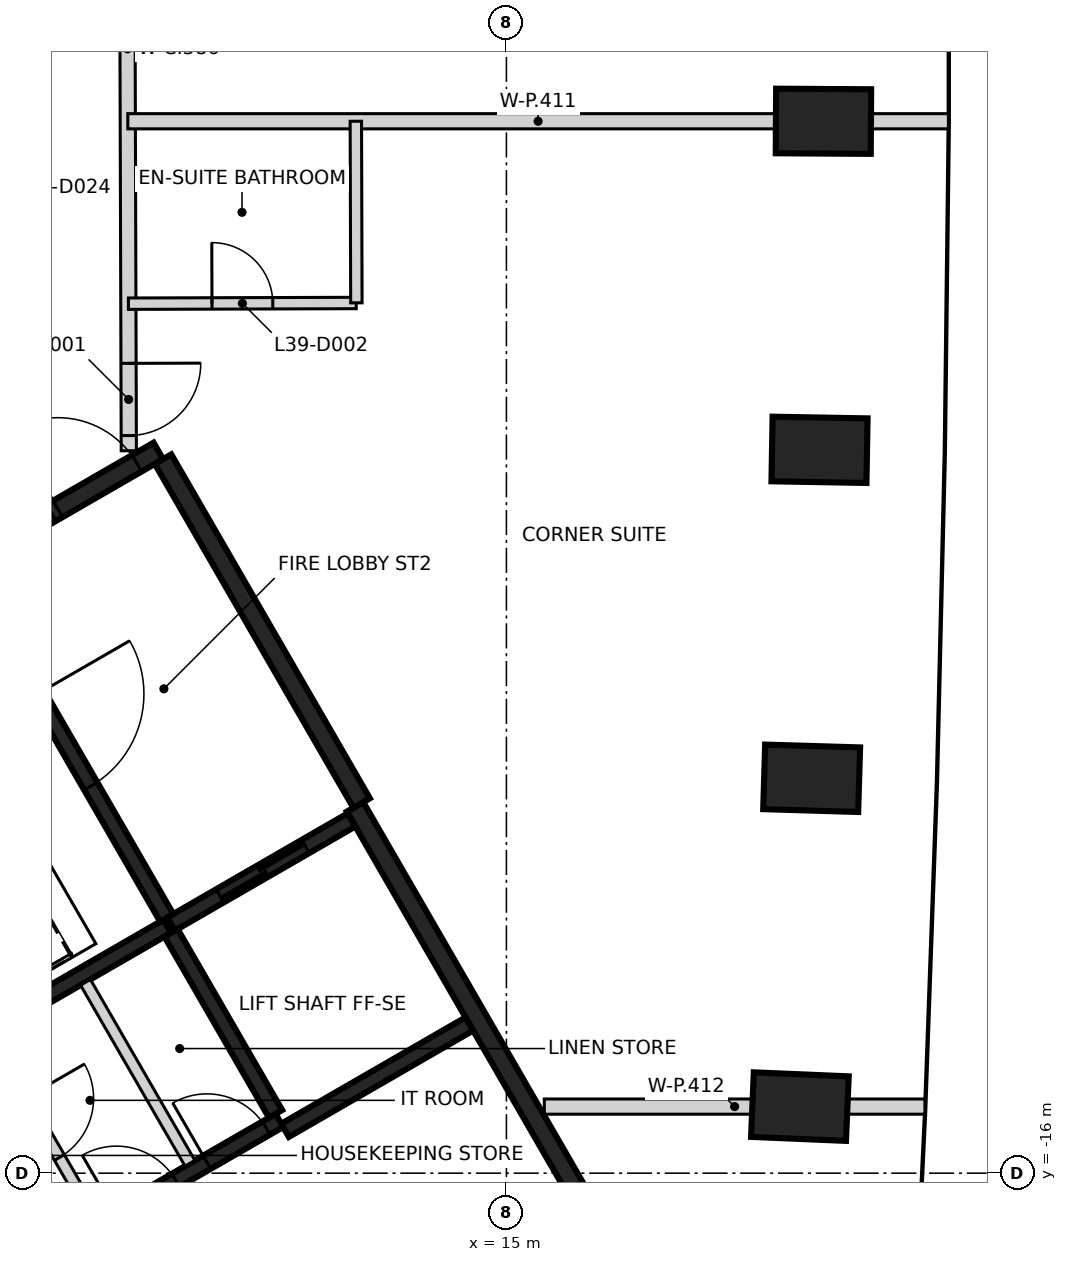
"""IFC4 building model, lengths in metres.
Left out: names, types, materials, properties, quantities, classifications, styles, units other than length and angle.
Written with IfcOpenShell. Run it as: python <this file> out.ifc"""

import sys

from ifc_helpers import new_model, si_unit, direction, frame, frame_2d, origin, origin_2d, place, context, subcontext, project, spatial, rectangle, extrude, element, fill, save


model = new_model("IFC4")
c1 = context("Model", 3, precision=1e-05, world=origin(), true_north=direction((0.0, 1.0)))
c2 = subcontext(c1, "Body", "Model", "MODEL_VIEW")
j1 = project(units=[si_unit("LENGTHUNIT", "METRE"), si_unit("PLANEANGLEUNIT", "RADIAN")], contexts=[c1])
p1 = place(None, origin())
s1 = spatial("IfcSite", under=j1, at=p1, CompositionType="ELEMENT")
p2 = place(p1, origin())
s2 = spatial("IfcBuilding", under=s1, at=p2, CompositionType="ELEMENT")
p3 = place(p2, frame((0.0, 0.0, 157.6)))
s3 = spatial("IfcBuildingStorey", under=s2, at=p3, CompositionType="ELEMENT", Elevation=157.6)
for number, where, z_axis, x_axis in (
    (1, (18.861, -15.124, -0.4), (0.0, 0.0, 1.0), (-0.999, 0.042, 0.0)),
    (2, (19.016, -10.805, -0.4), (0.0, 0.0, 1.0), (-1.0, 0.03, 0.0)),
    (3, (19.119, -6.484, -0.4), (0.0, 0.0, 1.0), (-1.0, 0.018, 0.0)),
    (4, (19.171, -2.161, -0.4), (0.0, 0.0, 1.0), (-1.0, 0.006, 0.0)),
):
    element("IfcColumn", number, at=place(p3, frame(where, z_axis=z_axis, x_axis=x_axis)), inside=s3, PredefinedType="COLUMN", context=c2, shape_type="SweptSolid", body=[
        extrude(rectangle(XDim=1.25, YDim=0.85, at=origin_2d()), origin(), (0.0, 0.0, 1.0), 3.6),
    ])
p4 = place(p3, frame((0.417, -12.273, 0.0), z_axis=(0.0, 0.0, 1.0), x_axis=(0.866021906294, 0.500006057782, 0.0)))
e5 = element("IfcWall", 5, at=p4, inside=s3, PredefinedType="SHEAR", context=c2, shape_type="SweptSolid", body=[
    extrude(rectangle(XDim=11.55, YDim=0.25, at=frame_2d((5.775, 0.0))), origin(), (0.0, 0.0, 1.0), 3.2),
])
p5 = place(p4, frame((10.025, 0.0, 0.0)))
e6 = element("IfcOpeningElement", 6, at=p5, cuts=e5, PredefinedType="OPENING", context=c2, shape_type="SweptSolid", body=[
    extrude(rectangle(XDim=1.2, YDim=2.1, at=frame_2d((0.6, 1.05))), frame((0.0, 0.135, 0.0), z_axis=(0.0, -1.0, 0.0), x_axis=(1.0, 0.0, 0.0)), (0.0, 0.0, 1.0), 0.27),
])
p6 = place(p4, frame((8.725, 0.0, 0.0)))
e7 = element("IfcOpeningElement", 7, at=p6, cuts=e5, PredefinedType="OPENING", context=c2, shape_type="SweptSolid", body=[
    extrude(rectangle(XDim=1.2, YDim=2.1, at=frame_2d((0.6, 1.05))), frame((0.0, 0.135, 0.0), z_axis=(0.0, -1.0, 0.0), x_axis=(1.0, 0.0, 0.0)), (0.0, 0.0, 1.0), 0.27),
])
p7 = place(p3, frame((13.008, -11.181, 0.0), z_axis=(0.0, 0.0, 1.0), x_axis=(0.500004234368, -0.866022959057, 0.0)))
e8 = element("IfcWall", 8, at=p7, inside=s3, PredefinedType="SHEAR", context=c2, shape_type="SweptSolid", body=[
    extrude(rectangle(XDim=6.25, YDim=0.25, at=frame_2d((3.125, 0.0))), origin(), (0.0, 0.0, 1.0), 3.2),
])
p8 = place(p3, frame((10.483, -6.606, 0.0), z_axis=(0.0, 0.0, 1.0), x_axis=(0.49999885962, -0.866026062182, 0.0)))
e9 = element("IfcWall", 9, at=p8, inside=s3, PredefinedType="SHEAR", context=c2, shape_type="SweptSolid", body=[
    extrude(rectangle(XDim=5.225, YDim=0.25, at=frame_2d((2.612, 0.0))), origin(), (0.0, 0.0, 1.0), 3.2),
])
p9 = place(p3, frame((10.538, -12.752, 0.0), z_axis=(0.0, 0.0, 1.0), x_axis=(-0.866038630372, -0.499977090179, 0.0)))
e10 = element("IfcWall", 10, at=p9, inside=s3, PredefinedType="SHEAR", context=c2, shape_type="SweptSolid", body=[
    extrude(rectangle(XDim=5.699, YDim=0.2, at=frame_2d((2.85, 0.0))), origin(), (0.0, 0.0, 1.0), 3.2),
])
p10 = place(p3, frame((7.077, -18.156, 0.0), z_axis=(0.0, 0.0, 1.0), x_axis=(0.866038630372, 0.499977090179, 0.0)))
e11 = element("IfcWall", 11, at=p10, inside=s3, PredefinedType="SHEAR", context=c2, shape_type="SweptSolid", body=[
    extrude(rectangle(XDim=5.699, YDim=0.2, at=frame_2d((2.85, 0.0))), origin(), (0.0, 0.0, 1.0), 3.2),
])
p11 = place(p10, frame((3.224, 0.0, 0.0)))
e12 = element("IfcOpeningElement", 12, at=p11, cuts=e11, PredefinedType="OPENING", context=c2, shape_type="SweptSolid", body=[
    extrude(rectangle(XDim=0.9, YDim=2.1, at=frame_2d((0.45, 1.05))), frame((0.0, 0.11, 0.0), z_axis=(0.0, -1.0, 0.0), x_axis=(1.0, 0.0, 0.0)), (0.0, 0.0, 1.0), 0.22),
])
p12 = place(p10, frame((4.599, 0.0, 0.0)))
e13 = element("IfcOpeningElement", 13, at=p12, cuts=e11, PredefinedType="OPENING", context=c2, shape_type="SweptSolid", body=[
    extrude(rectangle(XDim=0.9, YDim=2.1, at=frame_2d((0.45, 1.05))), frame((0.0, 0.11, 0.0), z_axis=(0.0, -1.0, 0.0), x_axis=(1.0, 0.0, 0.0)), (0.0, 0.0, 1.0), 0.22),
])
p13 = place(p3, frame((7.906, -8.094, 0.0), z_axis=(0.0, 0.0, 1.0), x_axis=(0.500024287448, -0.866011380966, 0.0)))
e14 = element("IfcWall", 14, at=p13, inside=s3, PredefinedType="SHEAR", context=c2, shape_type="SweptSolid", body=[
    extrude(rectangle(XDim=5.251, YDim=0.2, at=frame_2d((2.625, 0.0))), origin(), (0.0, 0.0, 1.0), 3.2),
])
p14 = place(p13, frame((1.849, 0.0, 0.0)))
e15 = element("IfcOpeningElement", 15, at=p14, cuts=e14, PredefinedType="OPENING", context=c2, shape_type="SweptSolid", body=[
    extrude(rectangle(XDim=1.4, YDim=2.1, at=frame_2d((0.7, 1.05))), frame((0.0, 0.11, 0.0), z_axis=(0.0, -1.0, 0.0), x_axis=(1.0, 0.0, 0.0)), (0.0, 0.0, 1.0), 0.22),
])
p15 = place(p3, frame((11.963, -15.22, 0.0), z_axis=(0.0, 0.0, 1.0), x_axis=(-0.500034990121, 0.866005201286, 0.0)))
e16 = element("IfcWall", 16, at=p15, inside=s3, PredefinedType="SHEAR", context=c2, shape_type="SweptSolid", body=[
    extrude(rectangle(XDim=2.75, YDim=0.2, at=frame_2d((1.375, 0.0))), origin(), (0.0, 0.0, 1.0), 3.2),
])
p16 = place(p3, frame((10.587, -12.723, 0.0), z_axis=(0.0, 0.0, 1.0), x_axis=(0.866037306777, 0.499979382845, 0.0)))
e17 = element("IfcWall", 17, at=p16, inside=s3, PredefinedType="SHEAR", context=c2, shape_type="SweptSolid", body=[
    extrude(rectangle(XDim=2.742, YDim=0.2, at=frame_2d((1.371, 0.0))), origin(), (0.0, 0.0, 1.0), 3.2),
])
p17 = place(p16, frame((0.743, 0.0, 0.0)))
e18 = element("IfcOpeningElement", 18, at=p17, cuts=e17, PredefinedType="OPENING", context=c2, shape_type="SweptSolid", body=[
    extrude(rectangle(XDim=1.3, YDim=2.1, at=frame_2d((0.65, 1.05))), frame((0.0, 0.11, 0.0), z_axis=(0.0, -1.0, 0.0), x_axis=(1.0, 0.0, 0.0)), (0.0, 0.0, 1.0), 0.22),
])
p18 = place(p3, frame((14.512, -14.037, 0.0), z_axis=(0.0, 0.0, 1.0), x_axis=(-0.866044696403, -0.499966582715, 0.0)))
e19 = element("IfcWall", 19, at=p18, inside=s3, PredefinedType="SHEAR", context=c2, shape_type="SweptSolid", body=[
    extrude(rectangle(XDim=2.799, YDim=0.2, at=frame_2d((1.399, 0.0))), origin(), (0.0, 0.0, 1.0), 3.2),
])
p19 = place(p3, frame((8.207, -14.214, 0.0), z_axis=(0.0, 0.0, 1.0), x_axis=(0.50002746344, -0.86600954718, 0.0)))
e20 = element("IfcWall", 20, at=p19, inside=s3, PredefinedType="PARTITIONING", context=c2, shape_type="SweptSolid", body=[
    extrude(rectangle(XDim=2.748, YDim=0.15, at=frame_2d((1.374, 0.0))), origin(), (0.0, 0.0, 1.0), 3.2),
])
p20 = place(p19, frame((0.924, 0.0, 0.0)))
e21 = element("IfcOpeningElement", 21, at=p20, cuts=e20, PredefinedType="OPENING", context=c2, shape_type="SweptSolid", body=[
    extrude(rectangle(XDim=0.9, YDim=2.1, at=frame_2d((0.45, 1.05))), frame((0.0, 0.085, 0.0), z_axis=(0.0, -1.0, 0.0), x_axis=(1.0, 0.0, 0.0)), (0.0, 0.0, 1.0), 0.17),
])
p21 = place(p3, frame((9.462, -13.489, 0.0), z_axis=(0.0, 0.0, 1.0), x_axis=(0.499988999718, -0.866031754707, 0.0)))
e22 = element("IfcWall", 22, at=p21, inside=s3, PredefinedType="PARTITIONING", context=c2, shape_type="SweptSolid", body=[
    extrude(rectangle(XDim=2.749, YDim=0.15, at=frame_2d((1.374, 0.0))), origin(), (0.0, 0.0, 1.0), 3.2),
])
p22 = place(p3, frame((10.0, 4.078, 0.0), z_axis=(0.0, 0.0, 1.0), x_axis=(0.003070798941, -0.999995285086, 0.0)))
e23 = element("IfcWall", 23, at=p22, inside=s3, PredefinedType="PARTITIONING", context=c2, shape_type="SweptSolid", body=[
    extrude(rectangle(XDim=10.574, YDim=0.2, at=frame_2d((5.287, 0.0))), origin(), (0.0, 0.0, 1.0), 3.2),
])
p23 = place(p22, frame((9.424, 0.0, 0.0)))
e24 = element("IfcOpeningElement", 24, at=p23, cuts=e23, PredefinedType="OPENING", context=c2, shape_type="SweptSolid", body=[
    extrude(rectangle(XDim=0.95, YDim=2.1, at=frame_2d((0.475, 1.05))), frame((0.0, 0.11, 0.0), z_axis=(0.0, -1.0, 0.0), x_axis=(1.0, 0.0, 0.0)), (0.0, 0.0, 1.0), 0.22),
])
p24 = place(p22, frame((2.651, 0.0, 0.0)))
e25 = element("IfcOpeningElement", 25, at=p24, cuts=e23, PredefinedType="OPENING", context=c2, shape_type="SweptSolid", body=[
    extrude(rectangle(XDim=0.95, YDim=2.1, at=frame_2d((0.475, 1.05))), frame((0.0, 0.11, 0.0), z_axis=(0.0, -1.0, 0.0), x_axis=(1.0, 0.0, 0.0)), (0.0, 0.0, 1.0), 0.22),
])
p25 = place(p3, frame((10.019, -2.161, 0.0), z_axis=(0.0, 0.0, 1.0), x_axis=(1.0, 0.0, 0.0)))
e26 = element("IfcWall", 26, at=p25, inside=s3, PredefinedType="PARTITIONING", context=c2, shape_type="SweptSolid", body=[
    extrude(rectangle(XDim=10.796, YDim=0.2, at=frame_2d((5.398, 0.0))), origin(), (0.0, 0.0, 1.0), 3.2),
])
p26 = place(p3, frame((15.498, -15.124, 0.0), z_axis=(0.0, 0.0, 1.0), x_axis=(1.0, 0.0, 0.0)))
e27 = element("IfcWall", 27, at=p26, inside=s3, PredefinedType="PARTITIONING", context=c2, shape_type="SweptSolid", body=[
    extrude(rectangle(XDim=5.008, YDim=0.2, at=frame_2d((2.504, 0.0))), origin(), (0.0, 0.0, 1.0), 3.2),
])
p27 = place(p3, frame((10.027, -4.561, 0.0), z_axis=(0.0, 0.0, 1.0), x_axis=(0.999995457159, 0.003014242926, 0.0)))
e28 = element("IfcWall", 28, at=p27, inside=s3, PredefinedType="PARTITIONING", context=c2, shape_type="SweptSolid", body=[
    extrude(rectangle(XDim=2.997, YDim=0.15, at=frame_2d((1.499, 0.0))), origin(), (0.0, 0.0, 1.0), 3.2),
])
p28 = place(p27, frame((1.099, 0.0, 0.0)))
e29 = element("IfcOpeningElement", 29, at=p28, cuts=e28, PredefinedType="OPENING", context=c2, shape_type="SweptSolid", body=[
    extrude(rectangle(XDim=0.8, YDim=2.1, at=frame_2d((0.4, 1.05))), frame((0.0, 0.085, 0.0), z_axis=(0.0, -1.0, 0.0), x_axis=(1.0, 0.0, 0.0)), (0.0, 0.0, 1.0), 0.17),
])
p29 = place(p3, frame((13.019, -2.161, 0.0), z_axis=(0.0, 0.0, 1.0), x_axis=(0.002861218617, -0.999995906706, 0.0)))
e30 = element("IfcWall", 30, at=p29, inside=s3, PredefinedType="PARTITIONING", context=c2, shape_type="SweptSolid", body=[
    extrude(rectangle(XDim=2.389, YDim=0.15, at=frame_2d((1.195, 0.0))), origin(), (0.0, 0.0, 1.0), 3.2),
])
p30 = place(p17, origin())
e31 = element("IfcDoor", 31, at=p30, inside=s3, OperationType="SLIDING_TO_RIGHT", PredefinedType="DOOR", context=c2, shape_type="SweptSolid", body=[
    extrude(rectangle(XDim=1.3, YDim=2.1, at=frame_2d((0.65, 1.05))), frame((0.0, 0.025, 0.0), z_axis=(0.0, -1.0, 0.0), x_axis=(1.0, 0.0, 0.0)), (0.0, 0.0, 1.0), 0.05),
])
fill(e18, e31)
p31 = place(p5, origin())
e32 = element("IfcDoor", 32, at=p31, inside=s3, OperationType="SINGLE_SWING_LEFT", PredefinedType="DOOR", context=c2, shape_type="SweptSolid", body=[
    extrude(rectangle(XDim=1.2, YDim=2.1, at=frame_2d((0.6, 1.05))), frame((0.0, 0.025, 0.0), z_axis=(0.0, -1.0, 0.0), x_axis=(1.0, 0.0, 0.0)), (0.0, 0.0, 1.0), 0.05),
])
fill(e6, e32)
p32 = place(p14, origin())
e33 = element("IfcDoor", 33, at=p32, inside=s3, OperationType="SINGLE_SWING_RIGHT", PredefinedType="DOOR", context=c2, shape_type="SweptSolid", body=[
    extrude(rectangle(XDim=1.4, YDim=2.1, at=frame_2d((0.7, 1.05))), frame((0.0, 0.025, 0.0), z_axis=(0.0, -1.0, 0.0), x_axis=(1.0, 0.0, 0.0)), (0.0, 0.0, 1.0), 0.05),
])
fill(e15, e33)
p33 = place(p11, origin())
e34 = element("IfcDoor", 34, at=p33, inside=s3, OperationType="SINGLE_SWING_LEFT", PredefinedType="DOOR", context=c2, shape_type="SweptSolid", body=[
    extrude(rectangle(XDim=0.9, YDim=2.1, at=frame_2d((0.45, 1.05))), frame((0.0, 0.025, 0.0), z_axis=(0.0, -1.0, 0.0), x_axis=(1.0, 0.0, 0.0)), (0.0, 0.0, 1.0), 0.05),
])
fill(e12, e34)
p34 = place(p12, origin())
e35 = element("IfcDoor", 35, at=p34, inside=s3, OperationType="SINGLE_SWING_RIGHT", PredefinedType="DOOR", context=c2, shape_type="SweptSolid", body=[
    extrude(rectangle(XDim=0.9, YDim=2.1, at=frame_2d((0.45, 1.05))), frame((0.0, 0.025, 0.0), z_axis=(0.0, -1.0, 0.0), x_axis=(1.0, 0.0, 0.0)), (0.0, 0.0, 1.0), 0.05),
])
fill(e13, e35)
p35 = place(p20, origin())
e36 = element("IfcDoor", 36, at=p35, inside=s3, OperationType="SINGLE_SWING_RIGHT", PredefinedType="DOOR", context=c2, shape_type="SweptSolid", body=[
    extrude(rectangle(XDim=0.9, YDim=2.1, at=frame_2d((0.45, 1.05))), frame((0.0, 0.025, 0.0), z_axis=(0.0, -1.0, 0.0), x_axis=(1.0, 0.0, 0.0)), (0.0, 0.0, 1.0), 0.05),
])
fill(e21, e36)
p36 = place(p23, origin())
e37 = element("IfcDoor", 37, at=p36, inside=s3, OperationType="SINGLE_SWING_LEFT", PredefinedType="DOOR", context=c2, shape_type="SweptSolid", body=[
    extrude(rectangle(XDim=0.95, YDim=2.1, at=frame_2d((0.475, 1.05))), frame((0.0, 0.025, 0.0), z_axis=(0.0, -1.0, 0.0), x_axis=(1.0, 0.0, 0.0)), (0.0, 0.0, 1.0), 0.05),
])
fill(e24, e37)
p37 = place(p28, frame((0.8, 0.0, 0.0), z_axis=(0.0, 0.0, 1.0), x_axis=(-1.0, 0.0, 0.0)))
e38 = element("IfcDoor", 38, at=p37, inside=s3, OperationType="SINGLE_SWING_LEFT", PredefinedType="DOOR", context=c2, shape_type="SweptSolid", body=[
    extrude(rectangle(XDim=0.8, YDim=2.1, at=frame_2d((0.4, 1.05))), frame((0.0, 0.025, 0.0), z_axis=(0.0, -1.0, 0.0), x_axis=(1.0, 0.0, 0.0)), (0.0, 0.0, 1.0), 0.05),
])
fill(e29, e38)
save(model, sys.argv[1])
